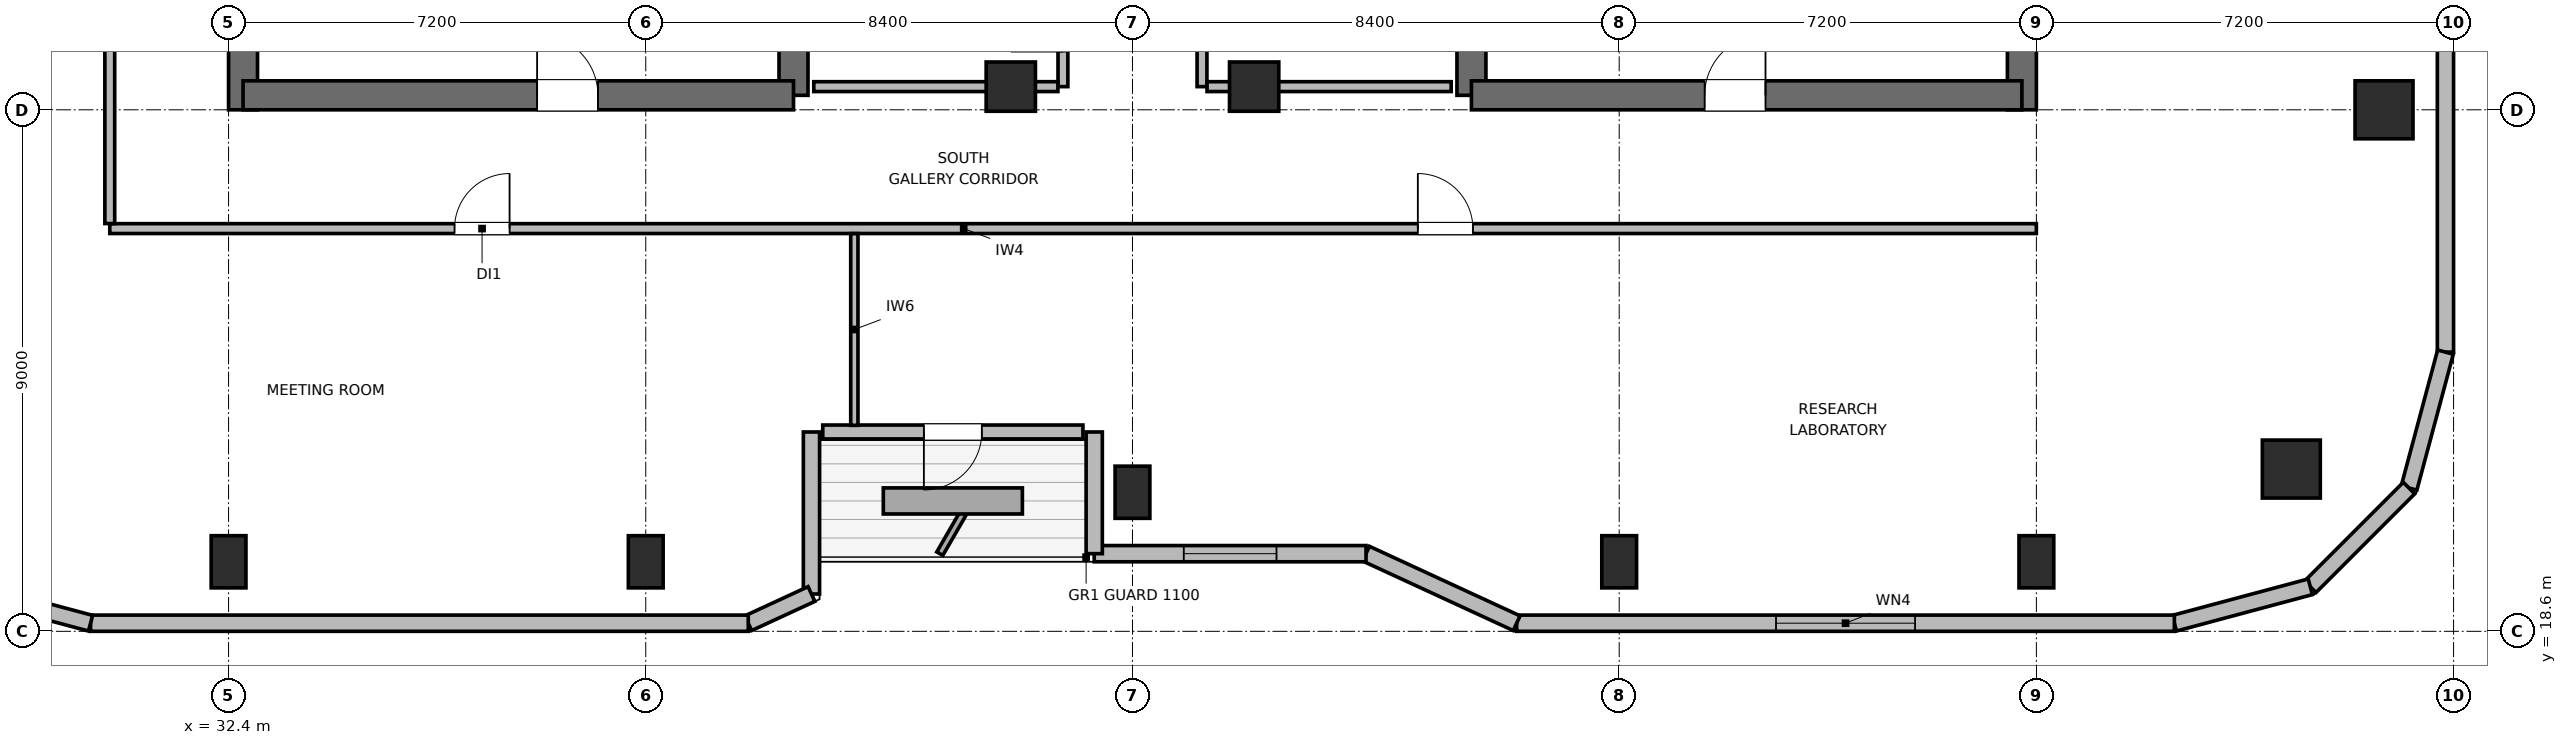
"""IFC4 building model, lengths in metres.
Left out: names, types, materials, properties, quantities, classifications, styles, units other than length and angle.
Written with IfcOpenShell. Run it as: python <this file> out.ifc"""

import sys

from ifc_helpers import new_model, si_unit, direction, frame, frame_2d, origin, origin_2d, place, context, subcontext, project, spatial, rectangle, circle, extrude, element, fill, save


model = new_model("IFC4")
c1 = context("Model", 3, precision=1e-05, world=origin(), true_north=direction((0.0, 1.0)))
c2 = subcontext(c1, "Body", "Model", "MODEL_VIEW")
j1 = project(units=[si_unit("LENGTHUNIT", "METRE"), si_unit("PLANEANGLEUNIT", "RADIAN")], contexts=[c1])
p1 = place(None, origin())
s1 = spatial("IfcSite", under=j1, at=p1, CompositionType="ELEMENT")
p2 = place(p1, origin())
s2 = spatial("IfcBuilding", under=s1, at=p2, CompositionType="ELEMENT")
p3 = place(p2, frame((0.0, 0.0, 274.5)))
s3 = spatial("IfcBuildingStorey", under=s2, at=p3, CompositionType="ELEMENT", Elevation=274.5)
p4 = place(p3, frame((32.65, 27.6, 0.0), z_axis=(0.0, 0.0, 1.0), x_axis=(0.0, 1.0, 0.0)))
e1 = element("IfcWall", 1, at=p4, inside=s3, PredefinedType="SHEAR", context=c2, shape_type="SweptSolid", body=[
    extrude(rectangle(XDim=16.8, YDim=0.5, at=frame_2d((8.4, 0.0))), origin(), (0.0, 0.0, 1.0), 3.9),
])
p5 = place(p3, frame((42.15, 27.85, 0.0), z_axis=(0.0, 0.0, 1.0), x_axis=(0.0, 1.0, 0.0)))
e2 = element("IfcWall", 2, at=p5, inside=s3, PredefinedType="SHEAR", context=c2, shape_type="SweptSolid", body=[
    extrude(rectangle(XDim=6.55, YDim=0.5, at=frame_2d((3.275, 0.0))), origin(), (0.0, 0.0, 1.0), 3.9),
])
p6 = place(p3, frame((32.65, 27.85, 0.0), z_axis=(0.0, 0.0, 1.0), x_axis=(1.0, 0.0, 0.0)))
e3 = element("IfcWall", 3, at=p6, inside=s3, PredefinedType="SHEAR", context=c2, shape_type="SweptSolid", body=[
    extrude(rectangle(XDim=9.5, YDim=0.5, at=frame_2d((4.75, 0.0))), origin(), (0.0, 0.0, 1.0), 3.9),
])
p7 = place(p6, frame((5.075, 0.0, 0.0)))
e4 = element("IfcOpeningElement", 4, at=p7, cuts=e3, PredefinedType="OPENING", context=c2, shape_type="SweptSolid", body=[
    extrude(rectangle(XDim=1.05, YDim=2.04, at=frame_2d((0.525, 1.02))), frame((0.0, 0.26, 0.0), z_axis=(0.0, -1.0, 0.0), x_axis=(1.0, 0.0, 0.0)), (0.0, 0.0, 1.0), 0.52),
])
p8 = place(p3, frame((53.85, 27.85, 0.0), z_axis=(0.0, 0.0, 1.0), x_axis=(0.0, 1.0, 0.0)))
e5 = element("IfcWall", 5, at=p8, inside=s3, PredefinedType="SHEAR", context=c2, shape_type="SweptSolid", body=[
    extrude(rectangle(XDim=7.95, YDim=0.5, at=frame_2d((3.975, 0.0))), origin(), (0.0, 0.0, 1.0), 3.9),
])
p9 = place(p3, frame((63.35, 27.6, 0.0), z_axis=(0.0, 0.0, 1.0), x_axis=(0.0, 1.0, 0.0)))
e6 = element("IfcWall", 6, at=p9, inside=s3, PredefinedType="SHEAR", context=c2, shape_type="SweptSolid", body=[
    extrude(rectangle(XDim=16.8, YDim=0.5, at=frame_2d((8.4, 0.0))), origin(), (0.0, 0.0, 1.0), 3.9),
])
p10 = place(p3, frame((53.85, 27.85, 0.0), z_axis=(0.0, 0.0, 1.0), x_axis=(1.0, 0.0, 0.0)))
e7 = element("IfcWall", 7, at=p10, inside=s3, PredefinedType="SHEAR", context=c2, shape_type="SweptSolid", body=[
    extrude(rectangle(XDim=9.5, YDim=0.5, at=frame_2d((4.75, 0.0))), origin(), (0.0, 0.0, 1.0), 3.9),
])
p11 = place(p10, frame((4.025, 0.0, 0.0)))
e8 = element("IfcOpeningElement", 8, at=p11, cuts=e7, PredefinedType="OPENING", context=c2, shape_type="SweptSolid", body=[
    extrude(rectangle(XDim=1.05, YDim=2.04, at=frame_2d((0.525, 1.02))), frame((0.0, 0.26, 0.0), z_axis=(0.0, -1.0, 0.0), x_axis=(1.0, 0.0, 0.0)), (0.0, 0.0, 1.0), 0.52),
])
p12 = place(p3, frame((68.0, 21.4, 0.0), z_axis=(0.0, 0.0, 1.0), x_axis=(1.0, 0.0, 0.0)))
e9 = element("IfcColumn", 9, at=p12, inside=s3, PredefinedType="COLUMN", context=c2, shape_type="SweptSolid", body=[
    extrude(circle(Radius=0.5, at=origin_2d()), origin(), (0.0, 0.0, 1.0), 3.9),
])
for number, where, z_axis, x_axis in (
    (10, (32.4, 19.8, 0.0), (0.0, 0.0, 1.0), (1.0, 0.0, 0.0)),
    (11, (39.6, 19.8, 0.0), (0.0, 0.0, 1.0), (1.0, 0.0, 0.0)),
    (12, (48.0, 21.0, 0.0), (0.0, 0.0, 1.0), (1.0, 0.0, 0.0)),
    (13, (56.4, 19.8, 0.0), (0.0, 0.0, 1.0), (1.0, 0.0, 0.0)),
    (14, (63.6, 19.8, 0.0), (0.0, 0.0, 1.0), (1.0, 0.0, 0.0)),
):
    element("IfcColumn", number, at=place(p3, frame(where, z_axis=z_axis, x_axis=x_axis)), inside=s3, PredefinedType="COLUMN", context=c2, shape_type="SweptSolid", body=[
        extrude(rectangle(XDim=0.6, YDim=0.9, at=origin_2d()), origin(), (0.0, 0.0, 1.0), 3.9),
    ])
p13 = place(p3, frame((69.6, 27.6, 0.0), z_axis=(0.0, 0.0, 1.0), x_axis=(1.0, 0.0, 0.0)))
e15 = element("IfcColumn", 15, at=p13, inside=s3, PredefinedType="COLUMN", context=c2, shape_type="SweptSolid", body=[
    extrude(rectangle(XDim=1.0, YDim=1.0, at=origin_2d()), origin(), (0.0, 0.0, 1.0), 3.9),
])
for number, where, z_axis, x_axis in (
    (16, (45.9, 28.0, 0.0), (0.0, 0.0, 1.0), (1.0, 0.0, 0.0)),
    (17, (50.1, 28.0, 0.0), (0.0, 0.0, 1.0), (1.0, 0.0, 0.0)),
):
    element("IfcColumn", number, at=place(p3, frame(where, z_axis=z_axis, x_axis=x_axis)), inside=s3, PredefinedType="COLUMN", context=c2, shape_type="SweptSolid", body=[
        extrude(rectangle(XDim=0.85, YDim=0.85, at=origin_2d()), origin(), (0.0, 0.0, 1.0), 3.9),
    ])
p14 = place(p3, frame((70.66, 37.66, 0.0), z_axis=(0.0, 0.0, 1.0), x_axis=(0.0, -1.0, 0.0)))
e18 = element("IfcWall", 18, at=p14, inside=s3, PredefinedType="SOLIDWALL", context=c2, shape_type="SweptSolid", body=[
    extrude(rectangle(XDim=14.241, YDim=0.28, at=frame_2d((7.121, 0.0))), origin(), (0.0, 0.0, 1.0), 3.68),
])
p15 = place(p14, frame((6.321, 0.0, 0.85)))
e19 = element("IfcOpeningElement", 19, at=p15, cuts=e18, PredefinedType="OPENING", context=c2, shape_type="SweptSolid", body=[
    extrude(rectangle(XDim=1.6, YDim=1.0, at=frame_2d((0.8, 0.5))), frame((0.0, 0.15, 0.0), z_axis=(0.0, -1.0, 0.0), x_axis=(1.0, 0.0, 0.0)), (0.0, 0.0, 1.0), 0.3),
])
p16 = place(p3, frame((70.66, 23.418, 0.0), z_axis=(0.0, 0.0, 1.0), x_axis=(-0.258751159445, -0.965944013639, 0.0)))
e20 = element("IfcWall", 20, at=p16, inside=s3, PredefinedType="SOLIDWALL", context=c2, shape_type="SweptSolid", body=[
    extrude(rectangle(XDim=2.429, YDim=0.28, at=frame_2d((1.214, 0.0))), origin(), (0.0, 0.0, 1.0), 3.68),
])
p17 = place(p3, frame((70.031, 21.073, 0.0), z_axis=(0.0, 0.0, 1.0), x_axis=(-0.707106781187, -0.707106781187, 0.0)))
e21 = element("IfcWall", 21, at=p17, inside=s3, PredefinedType="SOLIDWALL", context=c2, shape_type="SweptSolid", body=[
    extrude(rectangle(XDim=2.41, YDim=0.28, at=frame_2d((1.205, 0.0))), origin(), (0.0, 0.0, 1.0), 3.68),
])
p18 = place(p3, frame((68.327, 19.368, 0.0), z_axis=(0.0, 0.0, 1.0), x_axis=(-0.965937282298, -0.25877628691, 0.0)))
e22 = element("IfcWall", 22, at=p18, inside=s3, PredefinedType="SOLIDWALL", context=c2, shape_type="SweptSolid", body=[
    extrude(rectangle(XDim=2.428, YDim=0.28, at=frame_2d((1.214, 0.0))), origin(), (0.0, 0.0, 1.0), 3.68),
])
p19 = place(p3, frame((65.982, 18.74, 0.0), z_axis=(0.0, 0.0, 1.0), x_axis=(-1.0, 0.0, 0.0)))
e23 = element("IfcWall", 23, at=p19, inside=s3, PredefinedType="SOLIDWALL", context=c2, shape_type="SweptSolid", body=[
    extrude(rectangle(XDim=11.351, YDim=0.28, at=frame_2d((5.676, 0.0))), origin(), (0.0, 0.0, 1.0), 3.68),
])
p20 = place(p19, frame((4.475, 0.0, 0.85)))
e24 = element("IfcOpeningElement", 24, at=p20, cuts=e23, PredefinedType="OPENING", context=c2, shape_type="SweptSolid", body=[
    extrude(rectangle(XDim=2.4, YDim=1.15, at=frame_2d((1.2, 0.575))), frame((0.0, 0.15, 0.0), z_axis=(0.0, -1.0, 0.0), x_axis=(1.0, 0.0, 0.0)), (0.0, 0.0, 1.0), 0.3),
])
p21 = place(p3, frame((54.631, 18.74, 0.0), z_axis=(0.0, 0.0, 1.0), x_axis=(-0.907956889006, 0.419063584324, 0.0)))
e25 = element("IfcWall", 25, at=p21, inside=s3, PredefinedType="SOLIDWALL", context=c2, shape_type="SweptSolid", body=[
    extrude(rectangle(XDim=2.864, YDim=0.28, at=frame_2d((1.432, 0.0))), origin(), (0.0, 0.0, 1.0), 2.265),
])
p22 = place(p3, frame((52.031, 19.94, 0.0), z_axis=(0.0, 0.0, 1.0), x_axis=(-1.0, 0.0, 0.0)))
e26 = element("IfcWall", 26, at=p22, inside=s3, PredefinedType="SOLIDWALL", context=c2, shape_type="SweptSolid", body=[
    extrude(rectangle(XDim=4.691, YDim=0.28, at=frame_2d((2.345, 0.0))), origin(), (0.0, 0.0, 1.0), 2.265),
])
p23 = place(p22, frame((1.545, 0.0, 0.85)))
e27 = element("IfcOpeningElement", 27, at=p23, cuts=e26, PredefinedType="OPENING", context=c2, shape_type="SweptSolid", body=[
    extrude(rectangle(XDim=1.6, YDim=1.0, at=frame_2d((0.8, 0.5))), frame((0.0, 0.15, 0.0), z_axis=(0.0, -1.0, 0.0), x_axis=(1.0, 0.0, 0.0)), (0.0, 0.0, 1.0), 0.3),
])
p24 = place(p3, frame((47.34, 19.94, 0.0), z_axis=(0.0, 0.0, 1.0), x_axis=(0.0, 1.0, 0.0)))
e28 = element("IfcWall", 28, at=p24, inside=s3, PredefinedType="SOLIDWALL", context=c2, shape_type="SweptSolid", body=[
    extrude(rectangle(XDim=2.1, YDim=0.28, at=frame_2d((1.05, 0.0))), origin(), (0.0, 0.0, 1.0), 2.265),
])
p25 = place(p3, frame((47.145, 22.04, 0.0), z_axis=(0.0, 0.0, 1.0), x_axis=(-1.0, 0.0, 0.0)))
e29 = element("IfcWall", 29, at=p25, inside=s3, PredefinedType="SOLIDWALL", context=c2, shape_type="SweptSolid", body=[
    extrude(rectangle(XDim=4.49, YDim=0.24, at=frame_2d((2.245, 0.0))), origin(), (0.0, 0.0, 1.0), 3.68),
])
p26 = place(p25, frame((1.745, 0.0, 0.0)))
e30 = element("IfcOpeningElement", 30, at=p26, cuts=e29, PredefinedType="OPENING", context=c2, shape_type="SweptSolid", body=[
    extrude(rectangle(XDim=1.0, YDim=2.02, at=frame_2d((0.5, 1.01))), frame((0.0, 0.13, 0.0), z_axis=(0.0, -1.0, 0.0), x_axis=(1.0, 0.0, 0.0)), (0.0, 0.0, 1.0), 0.26),
])
p27 = place(p3, frame((42.46, 22.04, 0.0), z_axis=(0.0, 0.0, 1.0), x_axis=(0.0, -1.0, 0.0)))
e31 = element("IfcWall", 31, at=p27, inside=s3, PredefinedType="SOLIDWALL", context=c2, shape_type="SweptSolid", body=[
    extrude(rectangle(XDim=2.796, YDim=0.28, at=frame_2d((1.398, 0.0))), origin(), (0.0, 0.0, 1.0), 2.265),
])
p28 = place(p3, frame((42.46, 19.244, 0.0), z_axis=(0.0, 0.0, 1.0), x_axis=(-0.907893953211, -0.419199916176, 0.0)))
e32 = element("IfcWall", 32, at=p28, inside=s3, PredefinedType="SOLIDWALL", context=c2, shape_type="SweptSolid", body=[
    extrude(rectangle(XDim=1.201, YDim=0.28, at=frame_2d((0.601, 0.0))), origin(), (0.0, 0.0, 1.0), 3.68),
])
p29 = place(p3, frame((41.369, 18.74, 0.0), z_axis=(0.0, 0.0, 1.0), x_axis=(-1.0, 0.0, 0.0)))
e33 = element("IfcWall", 33, at=p29, inside=s3, PredefinedType="SOLIDWALL", context=c2, shape_type="SweptSolid", body=[
    extrude(rectangle(XDim=11.351, YDim=0.28, at=frame_2d((5.675, 0.0))), origin(), (0.0, 0.0, 1.0), 3.68),
])
p30 = place(p3, frame((30.018, 18.74, 0.0), z_axis=(0.0, 0.0, 1.0), x_axis=(-0.965937282298, 0.25877628691, 0.0)))
e34 = element("IfcWall", 34, at=p30, inside=s3, PredefinedType="SOLIDWALL", context=c2, shape_type="SweptSolid", body=[
    extrude(rectangle(XDim=2.428, YDim=0.28, at=frame_2d((1.214, 0.0))), origin(), (0.0, 0.0, 1.0), 3.68),
])
p31 = place(p3, frame((46.8, 28.0, 0.0), z_axis=(0.0, 0.0, 1.0), x_axis=(0.0, 1.0, 0.0)))
e35 = element("IfcWall", 35, at=p31, inside=s3, PredefinedType="PARTITIONING", context=c2, shape_type="SweptSolid", body=[
    extrude(rectangle(XDim=4.5, YDim=0.17, at=frame_2d((2.25, 0.0))), origin(), (0.0, 0.0, 1.0), 3.68),
])
p32 = place(p31, frame((0.605, 0.0, 0.0)))
e36 = element("IfcOpeningElement", 36, at=p32, cuts=e35, PredefinedType="OPENING", context=c2, shape_type="SweptSolid", body=[
    extrude(rectangle(XDim=0.9, YDim=2.02, at=frame_2d((0.45, 1.01))), frame((0.0, 0.095, 0.0), z_axis=(0.0, -1.0, 0.0), x_axis=(1.0, 0.0, 0.0)), (0.0, 0.0, 1.0), 0.19),
])
p33 = place(p31, frame((2.655, 0.0, 0.0)))
e37 = element("IfcOpeningElement", 37, at=p33, cuts=e35, PredefinedType="OPENING", context=c2, shape_type="SweptSolid", body=[
    extrude(rectangle(XDim=0.9, YDim=2.02, at=frame_2d((0.45, 1.01))), frame((0.0, 0.095, 0.0), z_axis=(0.0, -1.0, 0.0), x_axis=(1.0, 0.0, 0.0)), (0.0, 0.0, 1.0), 0.19),
])
p34 = place(p3, frame((42.5, 28.0, 0.0), z_axis=(0.0, 0.0, 1.0), x_axis=(1.0, 0.0, 0.0)))
e38 = element("IfcWall", 38, at=p34, inside=s3, PredefinedType="PARTITIONING", context=c2, shape_type="SweptSolid", body=[
    extrude(rectangle(XDim=4.213, YDim=0.17, at=frame_2d((2.106, 0.0))), origin(), (0.0, 0.0, 1.0), 2.765),
])
p35 = place(p3, frame((49.2, 28.0, 0.0), z_axis=(0.0, 0.0, 1.0), x_axis=(0.0, 1.0, 0.0)))
e39 = element("IfcWall", 39, at=p35, inside=s3, PredefinedType="PARTITIONING", context=c2, shape_type="SweptSolid", body=[
    extrude(rectangle(XDim=4.5, YDim=0.17, at=frame_2d((2.25, 0.0))), origin(), (0.0, 0.0, 1.0), 3.68),
])
p36 = place(p35, frame((0.99, 0.0, 0.0)))
e40 = element("IfcOpeningElement", 40, at=p36, cuts=e39, PredefinedType="OPENING", context=c2, shape_type="SweptSolid", body=[
    extrude(rectangle(XDim=0.9, YDim=2.02, at=frame_2d((0.45, 1.01))), frame((0.0, 0.095, 0.0), z_axis=(0.0, -1.0, 0.0), x_axis=(1.0, 0.0, 0.0)), (0.0, 0.0, 1.0), 0.19),
])
p37 = place(p35, frame((3.24, 0.0, 0.0)))
e41 = element("IfcOpeningElement", 41, at=p37, cuts=e39, PredefinedType="OPENING", context=c2, shape_type="SweptSolid", body=[
    extrude(rectangle(XDim=0.9, YDim=2.02, at=frame_2d((0.45, 1.01))), frame((0.0, 0.095, 0.0), z_axis=(0.0, -1.0, 0.0), x_axis=(1.0, 0.0, 0.0)), (0.0, 0.0, 1.0), 0.19),
])
p38 = place(p3, frame((49.287, 28.0, 0.0), z_axis=(0.0, 0.0, 1.0), x_axis=(1.0, 0.0, 0.0)))
e42 = element("IfcWall", 42, at=p38, inside=s3, PredefinedType="PARTITIONING", context=c2, shape_type="SweptSolid", body=[
    extrude(rectangle(XDim=4.213, YDim=0.17, at=frame_2d((2.106, 0.0))), origin(), (0.0, 0.0, 1.0), 2.765),
])
p39 = place(p3, frame((30.35, 25.55, 0.0), z_axis=(0.0, 0.0, 1.0), x_axis=(1.0, 0.0, 0.0)))
e43 = element("IfcWall", 43, at=p39, inside=s3, PredefinedType="PARTITIONING", context=c2, shape_type="SweptSolid", body=[
    extrude(rectangle(XDim=33.25, YDim=0.17, at=frame_2d((16.625, 0.0))), origin(), (0.0, 0.0, 1.0), 3.68),
])
p40 = place(p39, frame((5.95, 0.0, 0.0)))
e44 = element("IfcOpeningElement", 44, at=p40, cuts=e43, PredefinedType="OPENING", context=c2, shape_type="SweptSolid", body=[
    extrude(rectangle(XDim=0.95, YDim=2.04, at=frame_2d((0.475, 1.02))), frame((0.0, 0.095, 0.0), z_axis=(0.0, -1.0, 0.0), x_axis=(1.0, 0.0, 0.0)), (0.0, 0.0, 1.0), 0.19),
])
p41 = place(p39, frame((22.575, 0.0, 0.0)))
e45 = element("IfcOpeningElement", 45, at=p41, cuts=e43, PredefinedType="OPENING", context=c2, shape_type="SweptSolid", body=[
    extrude(rectangle(XDim=0.95, YDim=2.04, at=frame_2d((0.475, 1.02))), frame((0.0, 0.095, 0.0), z_axis=(0.0, -1.0, 0.0), x_axis=(1.0, 0.0, 0.0)), (0.0, 0.0, 1.0), 0.19),
])
p42 = place(p3, frame((30.35, 25.637, 0.0), z_axis=(0.0, 0.0, 1.0), x_axis=(0.0, 1.0, 0.0)))
e46 = element("IfcWall", 46, at=p42, inside=s3, PredefinedType="PARTITIONING", context=c2, shape_type="SweptSolid", body=[
    extrude(rectangle(XDim=20.726, YDim=0.17, at=frame_2d((10.363, 0.0))), origin(), (0.0, 0.0, 1.0), 3.68),
])
p43 = place(p42, frame((9.888, 0.0, 0.0)))
e47 = element("IfcOpeningElement", 47, at=p43, cuts=e46, PredefinedType="OPENING", context=c2, shape_type="SweptSolid", body=[
    extrude(rectangle(XDim=0.95, YDim=2.04, at=frame_2d((0.475, 1.02))), frame((0.0, 0.095, 0.0), z_axis=(0.0, -1.0, 0.0), x_axis=(1.0, 0.0, 0.0)), (0.0, 0.0, 1.0), 0.19),
])
p44 = place(p3, frame((43.2, 22.155, 0.0), z_axis=(0.0, 0.0, 1.0), x_axis=(0.0, 1.0, 0.0)))
e48 = element("IfcWall", 48, at=p44, inside=s3, PredefinedType="PARTITIONING", context=c2, shape_type="SweptSolid", body=[
    extrude(rectangle(XDim=3.308, YDim=0.125, at=frame_2d((1.654, 0.0))), origin(), (0.0, 0.0, 1.0), 3.043),
])
p45 = place(p20, origin())
e49 = element("IfcWindow", 49, at=p45, inside=s3, PartitioningType="SINGLE_PANEL", PredefinedType="WINDOW", context=c2, shape_type="SweptSolid", body=[
    extrude(rectangle(XDim=2.4, YDim=1.15, at=frame_2d((1.2, 0.575))), frame((0.0, 0.03, 0.0), z_axis=(0.0, -1.0, 0.0), x_axis=(1.0, 0.0, 0.0)), (0.0, 0.0, 1.0), 0.06),
])
fill(e24, e49)
p46 = place(p23, origin())
e50 = element("IfcWindow", 50, at=p46, inside=s3, PartitioningType="SINGLE_PANEL", PredefinedType="WINDOW", context=c2, shape_type="SweptSolid", body=[
    extrude(rectangle(XDim=1.6, YDim=1.0, at=frame_2d((0.8, 0.5))), frame((0.0, 0.03, 0.0), z_axis=(0.0, -1.0, 0.0), x_axis=(1.0, 0.0, 0.0)), (0.0, 0.0, 1.0), 0.06),
])
fill(e27, e50)
p47 = place(p26, origin())
e51 = element("IfcDoor", 51, at=p47, inside=s3, OperationType="SINGLE_SWING_RIGHT", PredefinedType="DOOR", context=c2, shape_type="SweptSolid", body=[
    extrude(rectangle(XDim=1.0, YDim=2.02, at=frame_2d((0.5, 1.01))), frame((0.0, 0.025, 0.0), z_axis=(0.0, -1.0, 0.0), x_axis=(1.0, 0.0, 0.0)), (0.0, 0.0, 1.0), 0.05),
])
fill(e30, e51)
p48 = place(p7, origin())
e52 = element("IfcDoor", 52, at=p48, inside=s3, OperationType="SINGLE_SWING_LEFT", PredefinedType="DOOR", context=c2, shape_type="SweptSolid", body=[
    extrude(rectangle(XDim=1.05, YDim=2.04, at=frame_2d((0.525, 1.02))), frame((0.0, 0.025, 0.0), z_axis=(0.0, -1.0, 0.0), x_axis=(1.0, 0.0, 0.0)), (0.0, 0.0, 1.0), 0.05),
])
fill(e4, e52)
p49 = place(p11, origin())
e53 = element("IfcDoor", 53, at=p49, inside=s3, OperationType="SINGLE_SWING_RIGHT", PredefinedType="DOOR", context=c2, shape_type="SweptSolid", body=[
    extrude(rectangle(XDim=1.05, YDim=2.04, at=frame_2d((0.525, 1.02))), frame((0.0, 0.025, 0.0), z_axis=(0.0, -1.0, 0.0), x_axis=(1.0, 0.0, 0.0)), (0.0, 0.0, 1.0), 0.05),
])
fill(e8, e53)
p50 = place(p40, origin())
e54 = element("IfcDoor", 54, at=p50, inside=s3, OperationType="SINGLE_SWING_RIGHT", PredefinedType="DOOR", context=c2, shape_type="SweptSolid", body=[
    extrude(rectangle(XDim=0.95, YDim=2.04, at=frame_2d((0.475, 1.02))), frame((0.0, 0.025, 0.0), z_axis=(0.0, -1.0, 0.0), x_axis=(1.0, 0.0, 0.0)), (0.0, 0.0, 1.0), 0.05),
])
fill(e44, e54)
p51 = place(p41, origin())
e55 = element("IfcDoor", 55, at=p51, inside=s3, OperationType="SINGLE_SWING_LEFT", PredefinedType="DOOR", context=c2, shape_type="SweptSolid", body=[
    extrude(rectangle(XDim=0.95, YDim=2.04, at=frame_2d((0.475, 1.02))), frame((0.0, 0.025, 0.0), z_axis=(0.0, -1.0, 0.0), x_axis=(1.0, 0.0, 0.0)), (0.0, 0.0, 1.0), 0.05),
])
fill(e45, e55)
save(model, sys.argv[1])
